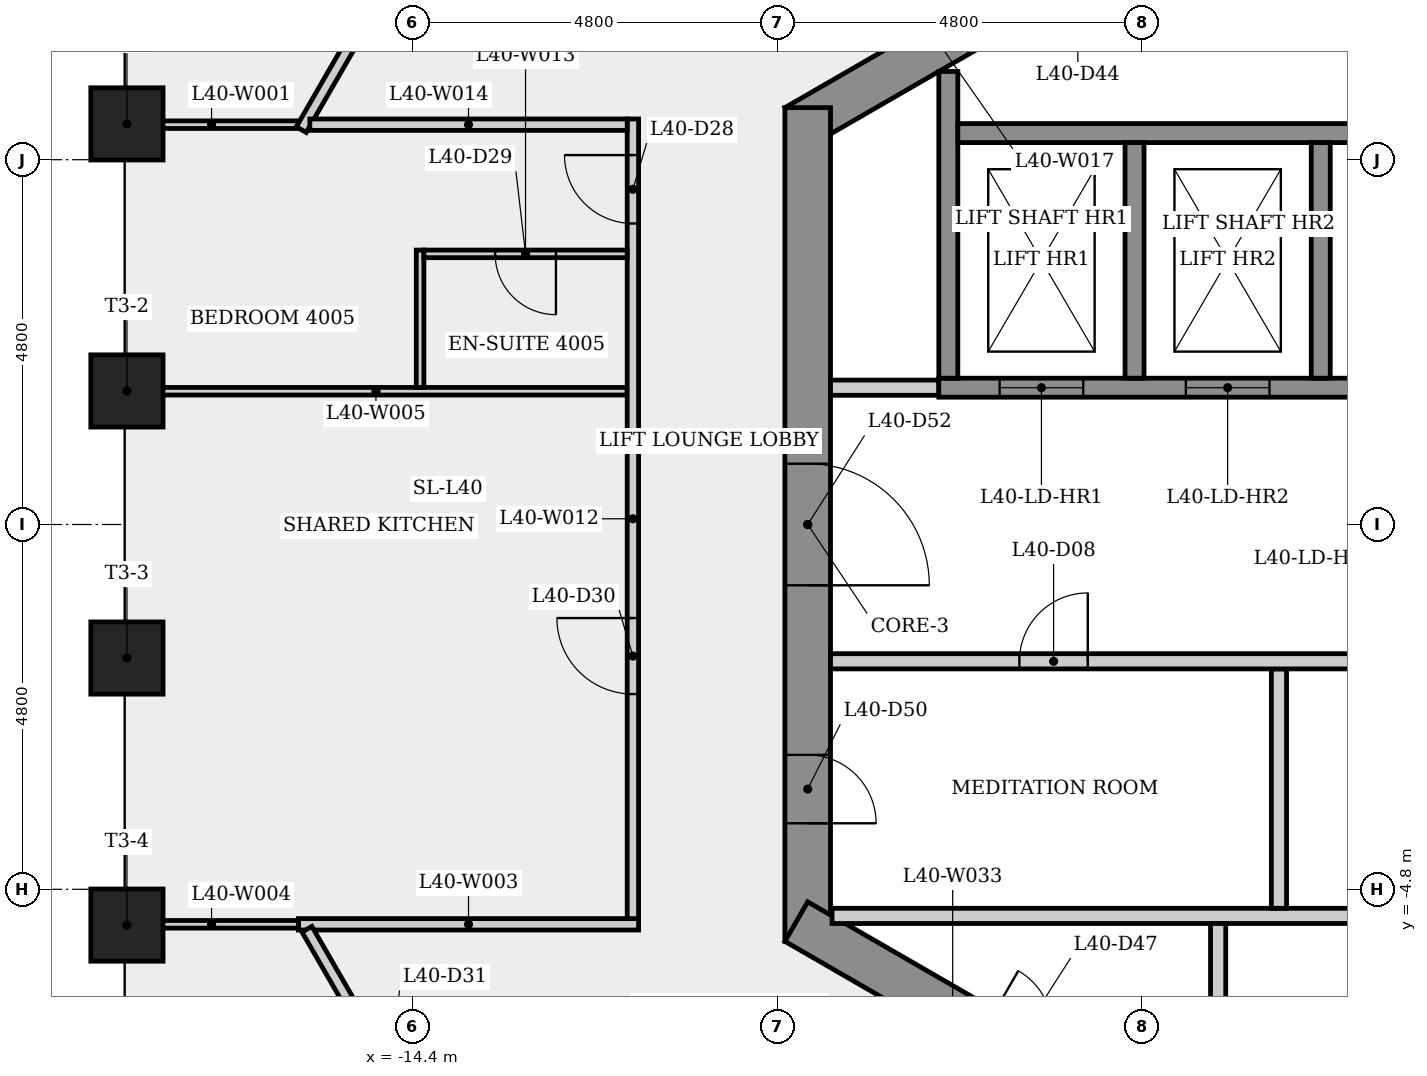
"""IFC4 building model, lengths in metres.
Left out: names, types, materials, properties, quantities, classifications, styles, units other than length and angle.
Written with IfcOpenShell. Run it as: python <this file> out.ifc"""

import sys

from ifc_helpers import new_model, si_unit, direction, frame, frame_2d, origin, origin_2d, place, context, subcontext, project, spatial, rectangle, extrude, element, fill, save


model = new_model("IFC4")
c1 = context("Model", 3, precision=1e-05, world=origin(), true_north=direction((0.0, 1.0)))
c2 = subcontext(c1, "Body", "Model", "MODEL_VIEW")
j1 = project(units=[si_unit("LENGTHUNIT", "METRE"), si_unit("PLANEANGLEUNIT", "RADIAN")], contexts=[c1])
p1 = place(None, origin())
s1 = spatial("IfcSite", under=j1, at=p1, CompositionType="ELEMENT")
p2 = place(p1, origin())
s2 = spatial("IfcBuilding", under=s1, at=p2, CompositionType="ELEMENT")
p3 = place(p2, frame((0.0, 0.0, 152.7)))
s3 = spatial("IfcBuildingStorey", under=s2, at=p3, CompositionType="ELEMENT", Elevation=152.7)
p4 = place(p3, frame((0.15, 10.71, 0.0), z_axis=(0.0, 0.0, 1.0), x_axis=(-0.866023993627, -0.500002442456, 0.0)))
e1 = element("IfcWall", 1, at=p4, inside=s3, PredefinedType="SHEAR", context=c2, shape_type="SweptSolid", body=[
    extrude(rectangle(XDim=10.97, YDim=0.6, at=frame_2d((5.485, 0.0))), origin(), (0.0, 0.0, 1.0), 3.4),
])
p5 = place(p4, frame((6.243, 0.0, 0.0)))
e2 = element("IfcOpeningElement", 2, at=p5, cuts=e1, PredefinedType="OPENING", context=c2, shape_type="SweptSolid", body=[
    extrude(rectangle(XDim=0.9, YDim=2.1, at=frame_2d((0.45, 1.05))), frame((0.0, 0.31, 0.0), z_axis=(0.0, -1.0, 0.0), x_axis=(1.0, 0.0, 0.0)), (0.0, 0.0, 1.0), 0.62),
])
p6 = place(p3, frame((-9.2, 5.485, 0.0), z_axis=(0.0, 0.0, 1.0), x_axis=(0.0, -1.0, 0.0)))
e3 = element("IfcWall", 3, at=p6, inside=s3, PredefinedType="SHEAR", context=c2, shape_type="SweptSolid", body=[
    extrude(rectangle(XDim=10.97, YDim=0.6, at=frame_2d((5.485, 0.0))), origin(), (0.0, 0.0, 1.0), 3.4),
])
p7 = place(p6, frame((8.516, 0.0, 0.0)))
e4 = element("IfcOpeningElement", 4, at=p7, cuts=e3, PredefinedType="OPENING", context=c2, shape_type="SweptSolid", body=[
    extrude(rectangle(XDim=0.9, YDim=2.1, at=frame_2d((0.45, 1.05))), frame((0.0, 0.31, 0.0), z_axis=(0.0, -1.0, 0.0), x_axis=(1.0, 0.0, 0.0)), (0.0, 0.0, 1.0), 0.62),
])
p8 = place(p6, frame((4.685, 0.0, 0.0)))
e5 = element("IfcOpeningElement", 5, at=p8, cuts=e3, PredefinedType="OPENING", context=c2, shape_type="SweptSolid", body=[
    extrude(rectangle(XDim=1.6, YDim=2.1, at=frame_2d((0.8, 1.05))), frame((0.0, 0.31, 0.0), z_axis=(0.0, -1.0, 0.0), x_axis=(1.0, 0.0, 0.0)), (0.0, 0.0, 1.0), 0.62),
])
p9 = place(p3, frame((-9.35, -5.225, 0.0), z_axis=(0.0, 0.0, 1.0), x_axis=(0.866023993627, -0.500002442456, 0.0)))
e6 = element("IfcWall", 6, at=p9, inside=s3, PredefinedType="SHEAR", context=c2, shape_type="SweptSolid", body=[
    extrude(rectangle(XDim=10.97, YDim=0.6, at=frame_2d((5.485, 0.0))), origin(), (0.0, 0.0, 1.0), 3.4),
])
p10 = place(p9, frame((2.853, 0.0, 0.0)))
e7 = element("IfcOpeningElement", 7, at=p10, cuts=e6, PredefinedType="OPENING", context=c2, shape_type="SweptSolid", body=[
    extrude(rectangle(XDim=0.9, YDim=2.1, at=frame_2d((0.45, 1.05))), frame((0.0, 0.31, 0.0), z_axis=(0.0, -1.0, 0.0), x_axis=(1.0, 0.0, 0.0)), (0.0, 0.0, 1.0), 0.62),
])
for number, where, z_axis, x_axis in (
    (8, (-18.157, 5.271, 0.0), (0.0, 0.0, 1.0), (-1.0, 0.0, 0.0)),
    (9, (-18.157, 1.757, 0.0), (0.0, 0.0, 1.0), (-1.0, 0.0, 0.0)),
    (10, (-18.157, -1.757, 0.0), (0.0, 0.0, 1.0), (-1.0, 0.0, 0.0)),
    (11, (-18.157, -5.271, 0.0), (0.0, 0.0, 1.0), (-1.0, 0.0, 0.0)),
):
    element("IfcColumn", number, at=place(p3, frame(where, z_axis=z_axis, x_axis=x_axis)), inside=s3, PredefinedType="COLUMN", context=c2, shape_type="SweptSolid", body=[
        extrude(rectangle(XDim=0.95, YDim=0.95, at=origin_2d()), origin(), (0.0, 0.0, 1.0), 3.4),
    ])
p11 = place(p3, frame((-15.901, 5.261, 0.0), z_axis=(0.0, 0.0, 1.0), x_axis=(-1.0, 0.0, 0.0)))
e12 = element("IfcWall", 12, at=p11, inside=s3, PredefinedType="PARTITIONING", context=c2, shape_type="SweptSolid", body=[
    extrude(rectangle(XDim=2.286, YDim=0.1, at=frame_2d((1.143, 0.0))), origin(), (0.0, 0.0, 1.0), 3.05),
])
p12 = place(p3, frame((-15.863, 5.196, 0.0), z_axis=(0.0, 0.0, 1.0), x_axis=(0.499991347294, 0.866030399369, 0.0)))
e13 = element("IfcWall", 13, at=p12, inside=s3, PredefinedType="PARTITIONING", context=c2, shape_type="SweptSolid", body=[
    extrude(rectangle(XDim=6.864, YDim=0.15, at=frame_2d((3.432, 0.0))), origin(), (0.0, 0.0, 1.0), 3.05),
])
p13 = place(p12, frame((2.932, 0.0, 0.0)))
e14 = element("IfcOpeningElement", 14, at=p13, cuts=e13, PredefinedType="OPENING", context=c2, shape_type="SweptSolid", body=[
    extrude(rectangle(XDim=1.0, YDim=2.1, at=frame_2d((0.5, 1.05))), frame((0.0, 0.085, 0.0), z_axis=(0.0, -1.0, 0.0), x_axis=(1.0, 0.0, 0.0)), (0.0, 0.0, 1.0), 0.17),
])
p14 = place(p3, frame((-15.901, -5.261, 0.0), z_axis=(0.0, 0.0, 1.0), x_axis=(1.0, 0.0, 0.0)))
e15 = element("IfcWall", 15, at=p14, inside=s3, PredefinedType="PARTITIONING", context=c2, shape_type="SweptSolid", body=[
    extrude(rectangle(XDim=4.476, YDim=0.15, at=frame_2d((2.238, 0.0))), origin(), (0.0, 0.0, 1.0), 3.05),
])
p15 = place(p3, frame((-15.901, -5.261, 0.0), z_axis=(0.0, 0.0, 1.0), x_axis=(-1.0, 0.0, 0.0)))
e16 = element("IfcWall", 16, at=p15, inside=s3, PredefinedType="PARTITIONING", context=c2, shape_type="SweptSolid", body=[
    extrude(rectangle(XDim=2.286, YDim=0.1, at=frame_2d((1.143, 0.0))), origin(), (0.0, 0.0, 1.0), 3.05),
])
p16 = place(p3, frame((-18.187, 1.754, 0.0), z_axis=(0.0, 0.0, 1.0), x_axis=(1.0, 0.0, 0.0)))
e17 = element("IfcWall", 17, at=p16, inside=s3, PredefinedType="PARTITIONING", context=c2, shape_type="SweptSolid", body=[
    extrude(rectangle(XDim=6.612, YDim=0.1, at=frame_2d((3.306, 0.0))), origin(), (0.0, 0.0, 1.0), 3.05),
])
p17 = place(p3, frame((-14.3, 3.611, 0.0), z_axis=(0.0, 0.0, 1.0), x_axis=(0.0, -1.0, 0.0)))
e18 = element("IfcWall", 18, at=p17, inside=s3, PredefinedType="PARTITIONING", context=c2, shape_type="SweptSolid", body=[
    extrude(rectangle(XDim=1.807, YDim=0.1, at=frame_2d((0.904, 0.0))), origin(), (0.0, 0.0, 1.0), 3.05),
])
p18 = place(p3, frame((-13.588, -9.136, 0.0), z_axis=(0.0, 0.0, 1.0), x_axis=(-0.50001224981, 0.866018331238, 0.0)))
e19 = element("IfcWall", 19, at=p18, inside=s3, PredefinedType="PARTITIONING", context=c2, shape_type="SweptSolid", body=[
    extrude(rectangle(XDim=4.4, YDim=0.15, at=frame_2d((2.2, 0.0))), origin(), (0.0, 0.0, 1.0), 3.05),
])
p19 = place(p18, frame((1.717, 0.0, 0.0)))
e20 = element("IfcOpeningElement", 20, at=p19, cuts=e19, PredefinedType="OPENING", context=c2, shape_type="SweptSolid", body=[
    extrude(rectangle(XDim=1.0, YDim=2.1, at=frame_2d((0.5, 1.05))), frame((0.0, 0.085, 0.0), z_axis=(0.0, -1.0, 0.0), x_axis=(1.0, 0.0, 0.0)), (0.0, 0.0, 1.0), 0.17),
])
p20 = place(p3, frame((-11.5, -5.186, 0.0), z_axis=(0.0, 0.0, 1.0), x_axis=(0.0, 1.0, 0.0)))
e21 = element("IfcWall", 21, at=p20, inside=s3, PredefinedType="PARTITIONING", context=c2, shape_type="SweptSolid", body=[
    extrude(rectangle(XDim=10.521, YDim=0.15, at=frame_2d((5.261, 0.0))), origin(), (0.0, 0.0, 1.0), 3.05),
])
p21 = place(p20, frame((9.146, 0.0, 0.0)))
e22 = element("IfcOpeningElement", 22, at=p21, cuts=e21, PredefinedType="OPENING", context=c2, shape_type="SweptSolid", body=[
    extrude(rectangle(XDim=0.9, YDim=2.1, at=frame_2d((0.45, 1.05))), frame((0.0, 0.085, 0.0), z_axis=(0.0, -1.0, 0.0), x_axis=(1.0, 0.0, 0.0)), (0.0, 0.0, 1.0), 0.17),
])
p22 = place(p20, frame((2.955, 0.0, 0.0)))
e23 = element("IfcOpeningElement", 23, at=p22, cuts=e21, PredefinedType="OPENING", context=c2, shape_type="SweptSolid", body=[
    extrude(rectangle(XDim=1.0, YDim=2.1, at=frame_2d((0.5, 1.05))), frame((0.0, 0.085, 0.0), z_axis=(0.0, -1.0, 0.0), x_axis=(1.0, 0.0, 0.0)), (0.0, 0.0, 1.0), 0.17),
])
p23 = place(p3, frame((-11.575, 3.561, 0.0), z_axis=(0.0, 0.0, 1.0), x_axis=(-1.0, 0.0, 0.0)))
e24 = element("IfcWall", 24, at=p23, inside=s3, PredefinedType="PARTITIONING", context=c2, shape_type="SweptSolid", body=[
    extrude(rectangle(XDim=2.675, YDim=0.1, at=frame_2d((1.337, 0.0))), origin(), (0.0, 0.0, 1.0), 3.05),
])
p24 = place(p23, frame((0.938, 0.0, 0.0)))
e25 = element("IfcOpeningElement", 25, at=p24, cuts=e24, PredefinedType="OPENING", context=c2, shape_type="SweptSolid", body=[
    extrude(rectangle(XDim=0.8, YDim=2.1, at=frame_2d((0.4, 1.05))), frame((0.0, 0.06, 0.0), z_axis=(0.0, -1.0, 0.0), x_axis=(1.0, 0.0, 0.0)), (0.0, 0.0, 1.0), 0.12),
])
p25 = place(p3, frame((-11.575, 5.261, 0.0), z_axis=(0.0, 0.0, 1.0), x_axis=(-1.0, 0.0, 0.0)))
e26 = element("IfcWall", 26, at=p25, inside=s3, PredefinedType="PARTITIONING", context=c2, shape_type="SweptSolid", body=[
    extrude(rectangle(XDim=4.176, YDim=0.15, at=frame_2d((2.088, 0.0))), origin(), (0.0, 0.0, 1.0), 3.05),
])
p26 = place(p3, frame((-8.9, 1.8, 0.0), z_axis=(0.0, 0.0, 1.0), x_axis=(1.0, 0.0, 0.0)))
e27 = element("IfcWall", 27, at=p26, inside=s3, PredefinedType="PARTITIONING", context=c2, shape_type="SweptSolid", body=[
    extrude(rectangle(XDim=1.425, YDim=0.2, at=frame_2d((0.712, 0.0))), origin(), (0.0, 0.0, 1.0), 3.05),
])
p27 = place(p3, frame((-8.88, -5.15, 0.0), z_axis=(0.0, 0.0, 1.0), x_axis=(1.0, 0.0, 0.0)))
e28 = element("IfcWall", 28, at=p27, inside=s3, PredefinedType="PARTITIONING", context=c2, shape_type="SweptSolid", body=[
    extrude(rectangle(XDim=11.205, YDim=0.2, at=frame_2d((5.603, 0.0))), origin(), (0.0, 0.0, 1.0), 3.05),
])
p28 = place(p3, frame((-7.475, 1.8, 0.0), z_axis=(0.0, 0.0, 1.0), x_axis=(1.0, 0.0, 0.0)))
e29 = element("IfcWall", 29, at=p28, inside=s3, PredefinedType="SHEAR", context=c2, shape_type="SweptSolid", body=[
    extrude(rectangle(XDim=14.95, YDim=0.25, at=frame_2d((7.475, 0.0))), origin(), (0.0, 0.0, 1.0), 3.05),
])
p29 = place(p28, frame((0.8, 0.0, 0.0)))
e30 = element("IfcOpeningElement", 30, at=p29, cuts=e29, PredefinedType="OPENING", context=c2, shape_type="SweptSolid", body=[
    extrude(rectangle(XDim=1.1, YDim=2.1, at=frame_2d((0.55, 1.05))), frame((0.0, 0.135, 0.0), z_axis=(0.0, -1.0, 0.0), x_axis=(1.0, 0.0, 0.0)), (0.0, 0.0, 1.0), 0.27),
])
p30 = place(p28, frame((3.25, 0.0, 0.0)))
e31 = element("IfcOpeningElement", 31, at=p30, cuts=e29, PredefinedType="OPENING", context=c2, shape_type="SweptSolid", body=[
    extrude(rectangle(XDim=1.1, YDim=2.1, at=frame_2d((0.55, 1.05))), frame((0.0, 0.135, 0.0), z_axis=(0.0, -1.0, 0.0), x_axis=(1.0, 0.0, 0.0)), (0.0, 0.0, 1.0), 0.27),
])
p31 = place(p28, frame((5.7, 0.0, 0.0)))
e32 = element("IfcOpeningElement", 32, at=p31, cuts=e29, PredefinedType="OPENING", context=c2, shape_type="SweptSolid", body=[
    extrude(rectangle(XDim=1.1, YDim=2.1, at=frame_2d((0.55, 1.05))), frame((0.0, 0.135, 0.0), z_axis=(0.0, -1.0, 0.0), x_axis=(1.0, 0.0, 0.0)), (0.0, 0.0, 1.0), 0.27),
])
p32 = place(p28, frame((8.15, 0.0, 0.0)))
e33 = element("IfcOpeningElement", 33, at=p32, cuts=e29, PredefinedType="OPENING", context=c2, shape_type="SweptSolid", body=[
    extrude(rectangle(XDim=1.1, YDim=2.1, at=frame_2d((0.55, 1.05))), frame((0.0, 0.135, 0.0), z_axis=(0.0, -1.0, 0.0), x_axis=(1.0, 0.0, 0.0)), (0.0, 0.0, 1.0), 0.27),
])
p33 = place(p28, frame((10.6, 0.0, 0.0)))
e34 = element("IfcOpeningElement", 34, at=p33, cuts=e29, PredefinedType="OPENING", context=c2, shape_type="SweptSolid", body=[
    extrude(rectangle(XDim=1.1, YDim=2.1, at=frame_2d((0.55, 1.05))), frame((0.0, 0.135, 0.0), z_axis=(0.0, -1.0, 0.0), x_axis=(1.0, 0.0, 0.0)), (0.0, 0.0, 1.0), 0.27),
])
p34 = place(p28, frame((13.05, 0.0, 0.0)))
e35 = element("IfcOpeningElement", 35, at=p34, cuts=e29, PredefinedType="OPENING", context=c2, shape_type="SweptSolid", body=[
    extrude(rectangle(XDim=1.1, YDim=2.1, at=frame_2d((0.55, 1.05))), frame((0.0, 0.135, 0.0), z_axis=(0.0, -1.0, 0.0), x_axis=(1.0, 0.0, 0.0)), (0.0, 0.0, 1.0), 0.27),
])
p35 = place(p3, frame((-7.35, 1.925, 0.0), z_axis=(0.0, 0.0, 1.0), x_axis=(0.0, 1.0, 0.0)))
e36 = element("IfcWall", 36, at=p35, inside=s3, PredefinedType="SHEAR", context=c2, shape_type="SweptSolid", body=[
    extrude(rectangle(XDim=4.036, YDim=0.25, at=frame_2d((2.018, 0.0))), origin(), (0.0, 0.0, 1.0), 3.05),
])
p36 = place(p3, frame((-7.225, 5.15, 0.0), z_axis=(0.0, 0.0, 1.0), x_axis=(1.0, 0.0, 0.0)))
e37 = element("IfcWall", 37, at=p36, inside=s3, PredefinedType="SHEAR", context=c2, shape_type="SweptSolid", body=[
    extrude(rectangle(XDim=14.7, YDim=0.25, at=frame_2d((7.35, 0.0))), origin(), (0.0, 0.0, 1.0), 3.05),
])
p37 = place(p3, frame((-4.9, 5.025, 0.0), z_axis=(0.0, 0.0, 1.0), x_axis=(0.0, -1.0, 0.0)))
e38 = element("IfcWall", 38, at=p37, inside=s3, PredefinedType="SHEAR", context=c2, shape_type="SweptSolid", body=[
    extrude(rectangle(XDim=3.1, YDim=0.25, at=frame_2d((1.55, 0.0))), origin(), (0.0, 0.0, 1.0), 3.4),
])
p38 = place(p3, frame((-3.8, -5.25, 0.0), z_axis=(0.0, 0.0, 1.0), x_axis=(0.0, -1.0, 0.0)))
e39 = element("IfcWall", 39, at=p38, inside=s3, PredefinedType="PARTITIONING", context=c2, shape_type="SweptSolid", body=[
    extrude(rectangle(XDim=2.833, YDim=0.2, at=frame_2d((1.417, 0.0))), origin(), (0.0, 0.0, 1.0), 3.05),
])
p39 = place(p3, frame((-3.0, -1.9, 0.0), z_axis=(0.0, 0.0, 1.0), x_axis=(0.0, -1.0, 0.0)))
e40 = element("IfcWall", 40, at=p39, inside=s3, PredefinedType="PARTITIONING", context=c2, shape_type="SweptSolid", body=[
    extrude(rectangle(XDim=3.15, YDim=0.2, at=frame_2d((1.575, 0.0))), origin(), (0.0, 0.0, 1.0), 3.05),
])
p40 = place(p3, frame((-8.9, -1.8, 0.0), z_axis=(0.0, 0.0, 1.0), x_axis=(1.0, 0.0, 0.0)))
e41 = element("IfcWall", 41, at=p40, inside=s3, PredefinedType="PARTITIONING", context=c2, shape_type="SweptSolid", body=[
    extrude(rectangle(XDim=11.225, YDim=0.2, at=frame_2d((5.613, 0.0))), origin(), (0.0, 0.0, 1.0), 3.05),
])
p41 = place(p40, frame((2.485, 0.0, 0.0)))
e42 = element("IfcOpeningElement", 42, at=p41, cuts=e41, PredefinedType="OPENING", context=c2, shape_type="SweptSolid", body=[
    extrude(rectangle(XDim=0.9, YDim=2.1, at=frame_2d((0.45, 1.05))), frame((0.0, 0.11, 0.0), z_axis=(0.0, -1.0, 0.0), x_axis=(1.0, 0.0, 0.0)), (0.0, 0.0, 1.0), 0.22),
])
p42 = place(p40, frame((8.387, 0.0, 0.0)))
e43 = element("IfcOpeningElement", 43, at=p42, cuts=e41, PredefinedType="OPENING", context=c2, shape_type="SweptSolid", body=[
    extrude(rectangle(XDim=0.9, YDim=2.1, at=frame_2d((0.45, 1.05))), frame((0.0, 0.11, 0.0), z_axis=(0.0, -1.0, 0.0), x_axis=(1.0, 0.0, 0.0)), (0.0, 0.0, 1.0), 0.22),
])
p43 = place(p3, frame((-2.45, 5.025, 0.0), z_axis=(0.0, 0.0, 1.0), x_axis=(0.0, -1.0, 0.0)))
e44 = element("IfcWall", 44, at=p43, inside=s3, PredefinedType="SHEAR", context=c2, shape_type="SweptSolid", body=[
    extrude(rectangle(XDim=3.1, YDim=0.25, at=frame_2d((1.55, 0.0))), origin(), (0.0, 0.0, 1.0), 3.4),
])
p44 = place(p29, origin())
e45 = element("IfcDoor", 45, at=p44, inside=s3, OperationType="SLIDING_TO_LEFT", PredefinedType="DOOR", context=c2, shape_type="SweptSolid", body=[
    extrude(rectangle(XDim=1.1, YDim=2.1, at=frame_2d((0.55, 1.05))), frame((0.0, 0.025, 0.0), z_axis=(0.0, -1.0, 0.0), x_axis=(1.0, 0.0, 0.0)), (0.0, 0.0, 1.0), 0.05),
])
fill(e30, e45)
p45 = place(p30, origin())
e46 = element("IfcDoor", 46, at=p45, inside=s3, OperationType="SLIDING_TO_LEFT", PredefinedType="DOOR", context=c2, shape_type="SweptSolid", body=[
    extrude(rectangle(XDim=1.1, YDim=2.1, at=frame_2d((0.55, 1.05))), frame((0.0, 0.025, 0.0), z_axis=(0.0, -1.0, 0.0), x_axis=(1.0, 0.0, 0.0)), (0.0, 0.0, 1.0), 0.05),
])
fill(e31, e46)
p46 = place(p41, origin())
e47 = element("IfcDoor", 47, at=p46, inside=s3, OperationType="SINGLE_SWING_RIGHT", PredefinedType="DOOR", context=c2, shape_type="SweptSolid", body=[
    extrude(rectangle(XDim=0.9, YDim=2.1, at=frame_2d((0.45, 1.05))), frame((0.0, 0.025, 0.0), z_axis=(0.0, -1.0, 0.0), x_axis=(1.0, 0.0, 0.0)), (0.0, 0.0, 1.0), 0.05),
])
fill(e42, e47)
p47 = place(p21, origin())
e48 = element("IfcDoor", 48, at=p47, inside=s3, OperationType="SINGLE_SWING_RIGHT", PredefinedType="DOOR", context=c2, shape_type="SweptSolid", body=[
    extrude(rectangle(XDim=0.9, YDim=2.1, at=frame_2d((0.45, 1.05))), frame((0.0, 0.025, 0.0), z_axis=(0.0, -1.0, 0.0), x_axis=(1.0, 0.0, 0.0)), (0.0, 0.0, 1.0), 0.05),
])
fill(e22, e48)
p48 = place(p24, origin())
e49 = element("IfcDoor", 49, at=p48, inside=s3, OperationType="SINGLE_SWING_LEFT", PredefinedType="DOOR", context=c2, shape_type="SweptSolid", body=[
    extrude(rectangle(XDim=0.8, YDim=2.1, at=frame_2d((0.4, 1.05))), frame((0.0, 0.025, 0.0), z_axis=(0.0, -1.0, 0.0), x_axis=(1.0, 0.0, 0.0)), (0.0, 0.0, 1.0), 0.05),
])
fill(e25, e49)
p49 = place(p22, origin())
e50 = element("IfcDoor", 50, at=p49, inside=s3, OperationType="SINGLE_SWING_RIGHT", PredefinedType="DOOR", context=c2, shape_type="SweptSolid", body=[
    extrude(rectangle(XDim=1.0, YDim=2.1, at=frame_2d((0.5, 1.05))), frame((0.0, 0.025, 0.0), z_axis=(0.0, -1.0, 0.0), x_axis=(1.0, 0.0, 0.0)), (0.0, 0.0, 1.0), 0.05),
])
fill(e23, e50)
p50 = place(p7, origin())
e51 = element("IfcDoor", 51, at=p50, inside=s3, OperationType="SINGLE_SWING_RIGHT", PredefinedType="DOOR", context=c2, shape_type="SweptSolid", body=[
    extrude(rectangle(XDim=0.9, YDim=2.1, at=frame_2d((0.45, 1.05))), frame((0.0, 0.025, 0.0), z_axis=(0.0, -1.0, 0.0), x_axis=(1.0, 0.0, 0.0)), (0.0, 0.0, 1.0), 0.05),
])
fill(e4, e51)
p51 = place(p8, origin())
e52 = element("IfcDoor", 52, at=p51, inside=s3, OperationType="SINGLE_SWING_RIGHT", PredefinedType="DOOR", context=c2, shape_type="SweptSolid", body=[
    extrude(rectangle(XDim=1.6, YDim=2.1, at=frame_2d((0.8, 1.05))), frame((0.0, 0.025, 0.0), z_axis=(0.0, -1.0, 0.0), x_axis=(1.0, 0.0, 0.0)), (0.0, 0.0, 1.0), 0.05),
])
fill(e5, e52)
save(model, sys.argv[1])
